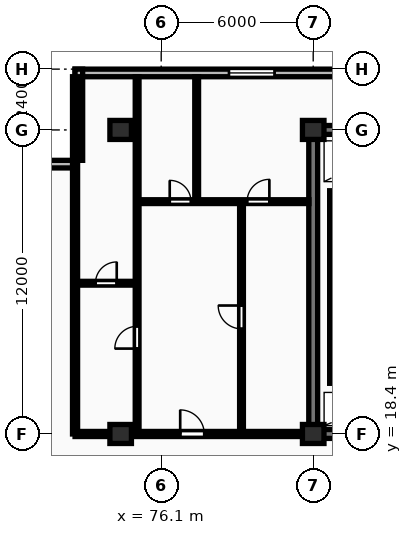
"""IFC4 building model, lengths in metres.
Left out: names, types, materials, properties, quantities, classifications, styles, units other than length and angle.
Written with IfcOpenShell. Run it as: python <this file> out.ifc"""

import sys

from ifc_helpers import new_model, si_unit, direction, frame, frame_2d, origin, origin_2d, place, context, subcontext, project, spatial, rectangle, extrude, element, fill, save


model = new_model("IFC4")
c1 = context("Model", 3, precision=1e-05, world=origin(), true_north=direction((0.0, 1.0)))
c2 = subcontext(c1, "Body", "Model", "MODEL_VIEW")
j1 = project(units=[si_unit("LENGTHUNIT", "METRE"), si_unit("PLANEANGLEUNIT", "RADIAN")], contexts=[c1])
p1 = place(None, origin())
s1 = spatial("IfcSite", under=j1, at=p1, CompositionType="ELEMENT")
p2 = place(p1, origin())
s2 = spatial("IfcBuilding", under=s1, at=p2, CompositionType="ELEMENT")
p3 = place(p2, frame((0.0, 0.0, 113.3)))
s3 = spatial("IfcBuildingStorey", under=s2, at=p3, CompositionType="ELEMENT", Elevation=113.3)
for number, where, z_axis, x_axis in (
    (1, (74.5, 18.4, 0.0), (0.0, 0.0, 1.0), (1.0, 0.0, 0.0)),
    (2, (74.5, 30.4, 0.0), (0.0, 0.0, 1.0), (1.0, 0.0, 0.0)),
    (3, (82.1, 18.4, 0.0), (0.0, 0.0, 1.0), (1.0, 0.0, 0.0)),
    (4, (82.1, 30.4, 0.0), (0.0, 0.0, 1.0), (1.0, 0.0, 0.0)),
):
    element("IfcColumn", number, at=place(p3, frame(where, z_axis=z_axis, x_axis=x_axis)), inside=s3, PredefinedType="COLUMN", context=c2, shape_type="SweptSolid", body=[
        extrude(rectangle(XDim=0.85, YDim=0.75, at=origin_2d()), origin(), (0.0, 0.0, 1.0), 3.25),
    ])
p4 = place(p3, frame((130.7, 32.65, 0.0), z_axis=(0.0, 0.0, 1.0), x_axis=(-1.0, 0.0, 0.0)))
e5 = element("IfcWall", 5, at=p4, inside=s3, PredefinedType="STANDARD", context=c2, shape_type="SweptSolid", body=[
    extrude(rectangle(XDim=58.0, YDim=0.3, at=frame_2d((29.0, 0.0))), origin(), (0.0, 0.0, 1.0), 2.97),
])
p5 = place(p4, frame((50.125, 0.0, 0.85)))
e6 = element("IfcOpeningElement", 6, at=p5, cuts=e5, PredefinedType="OPENING", context=c2, shape_type="SweptSolid", body=[
    extrude(rectangle(XDim=1.8, YDim=1.8, at=frame_2d((0.9, 0.9))), frame((0.0, 0.16, 0.0), z_axis=(0.0, -1.0, 0.0), x_axis=(1.0, 0.0, 0.0)), (0.0, 0.0, 1.0), 0.32),
])
p6 = place(p4, frame((6.775, 0.0, 0.85)))
e7 = element("IfcOpeningElement", 7, at=p6, cuts=e5, PredefinedType="OPENING", context=c2, shape_type="SweptSolid", body=[
    extrude(rectangle(XDim=1.8, YDim=1.8, at=frame_2d((0.9, 0.9))), frame((0.0, 0.16, 0.0), z_axis=(0.0, -1.0, 0.0), x_axis=(1.0, 0.0, 0.0)), (0.0, 0.0, 1.0), 0.32),
])
p7 = place(p3, frame((72.85, 32.8, 0.0), z_axis=(0.0, 0.0, 1.0), x_axis=(0.0, -1.0, 0.0)))
e8 = element("IfcWall", 8, at=p7, inside=s3, PredefinedType="STANDARD", context=c2, shape_type="SweptSolid", body=[
    extrude(rectangle(XDim=3.6, YDim=0.3, at=frame_2d((1.8, 0.0))), origin(), (0.0, 0.0, 1.0), 2.97),
])
p8 = place(p3, frame((72.7, 29.05, 0.0), z_axis=(0.0, 0.0, 1.0), x_axis=(-1.0, 0.0, 0.0)))
e9 = element("IfcWall", 9, at=p8, inside=s3, PredefinedType="STANDARD", context=c2, shape_type="SweptSolid", body=[
    extrude(rectangle(XDim=3.6, YDim=0.3, at=frame_2d((1.8, 0.0))), origin(), (0.0, 0.0, 1.0), 2.97),
])
p9 = place(p3, frame((81.925, 30.4, 0.0), z_axis=(0.0, 0.0, 1.0), x_axis=(1.0, 0.0, 0.0)))
e10 = element("IfcWall", 10, at=p9, inside=s3, PredefinedType="SHEAR", context=c2, shape_type="SweptSolid", body=[
    extrude(rectangle(XDim=36.265, YDim=0.35, at=frame_2d((18.132, 0.0))), origin(), (0.0, 0.0, 1.0), 3.25),
])
p10 = place(p3, frame((82.1, 18.575, 0.0), z_axis=(0.0, 0.0, 1.0), x_axis=(0.0, 1.0, 0.0)))
e11 = element("IfcWall", 11, at=p10, inside=s3, PredefinedType="SHEAR", context=c2, shape_type="SweptSolid", body=[
    extrude(rectangle(XDim=11.65, YDim=0.35, at=frame_2d((5.825, 0.0))), origin(), (0.0, 0.0, 1.0), 3.25),
])
p11 = place(p3, frame((81.925, 18.4, 0.0), z_axis=(0.0, 0.0, 1.0), x_axis=(1.0, 0.0, 0.0)))
e12 = element("IfcWall", 12, at=p11, inside=s3, PredefinedType="SHEAR", context=c2, shape_type="SweptSolid", body=[
    extrude(rectangle(XDim=36.265, YDim=0.35, at=frame_2d((18.132, 0.0))), origin(), (0.0, 0.0, 1.0), 3.25),
])
p12 = place(p11, frame((5.675, 0.0, 0.0)))
e13 = element("IfcOpeningElement", 13, at=p12, cuts=e12, PredefinedType="OPENING", context=c2, shape_type="SweptSolid", body=[
    extrude(rectangle(XDim=1.0, YDim=2.15, at=frame_2d((0.5, 1.075))), frame((0.0, 0.185, 0.0), z_axis=(0.0, -1.0, 0.0), x_axis=(1.0, 0.0, 0.0)), (0.0, 0.0, 1.0), 0.37),
])
p13 = place(p11, frame((21.925, 0.0, 0.0)))
e14 = element("IfcOpeningElement", 14, at=p13, cuts=e12, PredefinedType="OPENING", context=c2, shape_type="SweptSolid", body=[
    extrude(rectangle(XDim=1.5, YDim=2.2, at=frame_2d((0.75, 1.1))), frame((0.0, 0.185, 0.0), z_axis=(0.0, -1.0, 0.0), x_axis=(1.0, 0.0, 0.0)), (0.0, 0.0, 1.0), 0.37),
])
p14 = place(p11, frame((29.875, 0.0, 0.0)))
e15 = element("IfcOpeningElement", 15, at=p14, cuts=e12, PredefinedType="OPENING", context=c2, shape_type="SweptSolid", body=[
    extrude(rectangle(XDim=1.0, YDim=2.15, at=frame_2d((0.5, 1.075))), frame((0.0, 0.185, 0.0), z_axis=(0.0, -1.0, 0.0), x_axis=(1.0, 0.0, 0.0)), (0.0, 0.0, 1.0), 0.37),
])
p15 = place(p3, frame((82.875, 20.4, 0.0), z_axis=(0.0, 0.0, 1.0), x_axis=(0.0, 1.0, 0.0)))
e16 = element("IfcWall", 16, at=p15, inside=s3, PredefinedType="SHEAR", context=c2, shape_type="SweptSolid", body=[
    extrude(rectangle(XDim=7.6, YDim=0.25, at=frame_2d((3.8, 0.0))), origin(), (0.0, 0.0, 1.0), 3.25),
])
p16 = place(p3, frame((72.7, 18.4, 0.0), z_axis=(0.0, 0.0, 1.0), x_axis=(0.0, 1.0, 0.0)))
e17 = element("IfcWall", 17, at=p16, inside=s3, PredefinedType="PARTITIONING", context=c2, shape_type="SweptSolid", body=[
    extrude(rectangle(XDim=14.1, YDim=0.2, at=frame_2d((7.05, 0.0))), origin(), (0.0, 0.0, 1.0), 2.97),
])
p17 = place(p3, frame((72.7, 24.35, 0.0), z_axis=(0.0, 0.0, 1.0), x_axis=(1.0, 0.0, 0.0)))
e18 = element("IfcWall", 18, at=p17, inside=s3, PredefinedType="PARTITIONING", context=c2, shape_type="SweptSolid", body=[
    extrude(rectangle(XDim=2.45, YDim=0.15, at=frame_2d((1.225, 0.0))), origin(), (0.0, 0.0, 1.0), 2.97),
])
p18 = place(p17, frame((0.805, 0.0, 0.0)))
e19 = element("IfcOpeningElement", 19, at=p18, cuts=e18, PredefinedType="OPENING", context=c2, shape_type="SweptSolid", body=[
    extrude(rectangle(XDim=0.84, YDim=2.04, at=frame_2d((0.42, 1.02))), frame((0.0, 0.085, 0.0), z_axis=(0.0, -1.0, 0.0), x_axis=(1.0, 0.0, 0.0)), (0.0, 0.0, 1.0), 0.17),
])
p19 = place(p3, frame((75.15, 18.45, 0.0), z_axis=(0.0, 0.0, 1.0), x_axis=(0.0, 1.0, 0.0)))
e20 = element("IfcWall", 20, at=p19, inside=s3, PredefinedType="PARTITIONING", context=c2, shape_type="SweptSolid", body=[
    extrude(rectangle(XDim=14.05, YDim=0.15, at=frame_2d((7.025, 0.0))), origin(), (0.0, 0.0, 1.0), 2.97),
])
p20 = place(p19, frame((3.32, 0.0, 0.0)))
e21 = element("IfcOpeningElement", 21, at=p20, cuts=e20, PredefinedType="OPENING", context=c2, shape_type="SweptSolid", body=[
    extrude(rectangle(XDim=0.88, YDim=2.06, at=frame_2d((0.44, 1.03))), frame((0.0, 0.085, 0.0), z_axis=(0.0, -1.0, 0.0), x_axis=(1.0, 0.0, 0.0)), (0.0, 0.0, 1.0), 0.17),
])
p21 = place(p3, frame((79.27, 18.45, 0.0), z_axis=(0.0, 0.0, 1.0), x_axis=(0.0, 1.0, 0.0)))
e22 = element("IfcWall", 22, at=p21, inside=s3, PredefinedType="PARTITIONING", context=c2, shape_type="SweptSolid", body=[
    extrude(rectangle(XDim=9.12, YDim=0.15, at=frame_2d((4.56, 0.0))), origin(), (0.0, 0.0, 1.0), 2.97),
])
p22 = place(p21, frame((4.1, 0.0, 0.0)))
e23 = element("IfcOpeningElement", 23, at=p22, cuts=e22, PredefinedType="OPENING", context=c2, shape_type="SweptSolid", body=[
    extrude(rectangle(XDim=0.92, YDim=2.08, at=frame_2d((0.46, 1.04))), frame((0.0, 0.085, 0.0), z_axis=(0.0, -1.0, 0.0), x_axis=(1.0, 0.0, 0.0)), (0.0, 0.0, 1.0), 0.17),
])
p23 = place(p3, frame((77.5, 27.57, 0.0), z_axis=(0.0, 0.0, 1.0), x_axis=(0.0, 1.0, 0.0)))
e24 = element("IfcWall", 24, at=p23, inside=s3, PredefinedType="PARTITIONING", context=c2, shape_type="SweptSolid", body=[
    extrude(rectangle(XDim=4.93, YDim=0.15, at=frame_2d((2.465, 0.0))), origin(), (0.0, 0.0, 1.0), 2.97),
])
p24 = place(p3, frame((75.17, 27.57, 0.0), z_axis=(0.0, 0.0, 1.0), x_axis=(1.0, 0.0, 0.0)))
e25 = element("IfcWall", 25, at=p24, inside=s3, PredefinedType="PARTITIONING", context=c2, shape_type="SweptSolid", body=[
    extrude(rectangle(XDim=6.76, YDim=0.15, at=frame_2d((3.38, 0.0))), origin(), (0.0, 0.0, 1.0), 2.97),
])
p25 = place(p24, frame((1.266, 0.0, 0.0)))
e26 = element("IfcOpeningElement", 26, at=p25, cuts=e25, PredefinedType="OPENING", context=c2, shape_type="SweptSolid", body=[
    extrude(rectangle(XDim=0.84, YDim=2.04, at=frame_2d((0.42, 1.02))), frame((0.0, 0.085, 0.0), z_axis=(0.0, -1.0, 0.0), x_axis=(1.0, 0.0, 0.0)), (0.0, 0.0, 1.0), 0.17),
])
p26 = place(p24, frame((4.32, 0.0, 0.0)))
e27 = element("IfcOpeningElement", 27, at=p26, cuts=e25, PredefinedType="OPENING", context=c2, shape_type="SweptSolid", body=[
    extrude(rectangle(XDim=0.88, YDim=2.06, at=frame_2d((0.44, 1.03))), frame((0.0, 0.085, 0.0), z_axis=(0.0, -1.0, 0.0), x_axis=(1.0, 0.0, 0.0)), (0.0, 0.0, 1.0), 0.17),
])
p27 = place(p3, frame((72.7, 18.4, 0.0), z_axis=(0.0, 0.0, 1.0), x_axis=(1.0, 0.0, 0.0)))
e28 = element("IfcWall", 28, at=p27, inside=s3, PredefinedType="PARTITIONING", context=c2, shape_type="SweptSolid", body=[
    extrude(rectangle(XDim=9.25, YDim=0.2, at=frame_2d((4.625, 0.0))), origin(), (0.0, 0.0, 1.0), 2.358),
])
p28 = place(p27, frame((4.15, 0.0, 0.0)))
e29 = element("IfcOpeningElement", 29, at=p28, cuts=e28, PredefinedType="OPENING", context=c2, shape_type="SweptSolid", body=[
    extrude(rectangle(XDim=0.95, YDim=2.15, at=frame_2d((0.475, 1.075))), frame((0.0, 0.11, 0.0), z_axis=(0.0, -1.0, 0.0), x_axis=(1.0, 0.0, 0.0)), (0.0, 0.0, 1.0), 0.22),
])
p29 = place(p5, origin())
e30 = element("IfcWindow", 30, at=p29, inside=s3, PartitioningType="SINGLE_PANEL", PredefinedType="WINDOW", context=c2, shape_type="SweptSolid", body=[
    extrude(rectangle(XDim=1.8, YDim=1.8, at=frame_2d((0.9, 0.9))), frame((0.0, 0.03, 0.0), z_axis=(0.0, -1.0, 0.0), x_axis=(1.0, 0.0, 0.0)), (0.0, 0.0, 1.0), 0.06),
])
fill(e6, e30)
p30 = place(p18, origin())
e31 = element("IfcDoor", 31, at=p30, inside=s3, OperationType="SINGLE_SWING_RIGHT", PredefinedType="DOOR", context=c2, shape_type="SweptSolid", body=[
    extrude(rectangle(XDim=0.84, YDim=2.04, at=frame_2d((0.42, 1.02))), frame((0.0, 0.025, 0.0), z_axis=(0.0, -1.0, 0.0), x_axis=(1.0, 0.0, 0.0)), (0.0, 0.0, 1.0), 0.05),
])
fill(e19, e31)
p31 = place(p20, origin())
e32 = element("IfcDoor", 32, at=p31, inside=s3, OperationType="SINGLE_SWING_LEFT", PredefinedType="DOOR", context=c2, shape_type="SweptSolid", body=[
    extrude(rectangle(XDim=0.88, YDim=2.06, at=frame_2d((0.44, 1.03))), frame((0.0, 0.025, 0.0), z_axis=(0.0, -1.0, 0.0), x_axis=(1.0, 0.0, 0.0)), (0.0, 0.0, 1.0), 0.05),
])
fill(e21, e32)
p32 = place(p22, origin())
e33 = element("IfcDoor", 33, at=p32, inside=s3, OperationType="SINGLE_SWING_RIGHT", PredefinedType="DOOR", context=c2, shape_type="SweptSolid", body=[
    extrude(rectangle(XDim=0.92, YDim=2.08, at=frame_2d((0.46, 1.04))), frame((0.0, 0.025, 0.0), z_axis=(0.0, -1.0, 0.0), x_axis=(1.0, 0.0, 0.0)), (0.0, 0.0, 1.0), 0.05),
])
fill(e23, e33)
p33 = place(p25, origin())
e34 = element("IfcDoor", 34, at=p33, inside=s3, OperationType="SINGLE_SWING_LEFT", PredefinedType="DOOR", context=c2, shape_type="SweptSolid", body=[
    extrude(rectangle(XDim=0.84, YDim=2.04, at=frame_2d((0.42, 1.02))), frame((0.0, 0.025, 0.0), z_axis=(0.0, -1.0, 0.0), x_axis=(1.0, 0.0, 0.0)), (0.0, 0.0, 1.0), 0.05),
])
fill(e26, e34)
p34 = place(p26, origin())
e35 = element("IfcDoor", 35, at=p34, inside=s3, OperationType="SINGLE_SWING_RIGHT", PredefinedType="DOOR", context=c2, shape_type="SweptSolid", body=[
    extrude(rectangle(XDim=0.88, YDim=2.06, at=frame_2d((0.44, 1.03))), frame((0.0, 0.025, 0.0), z_axis=(0.0, -1.0, 0.0), x_axis=(1.0, 0.0, 0.0)), (0.0, 0.0, 1.0), 0.05),
])
fill(e27, e35)
p35 = place(p28, origin())
e36 = element("IfcDoor", 36, at=p35, inside=s3, OperationType="SINGLE_SWING_LEFT", PredefinedType="DOOR", context=c2, shape_type="SweptSolid", body=[
    extrude(rectangle(XDim=0.95, YDim=2.15, at=frame_2d((0.475, 1.075))), frame((0.0, 0.025, 0.0), z_axis=(0.0, -1.0, 0.0), x_axis=(1.0, 0.0, 0.0)), (0.0, 0.0, 1.0), 0.05),
])
fill(e29, e36)
save(model, sys.argv[1])
